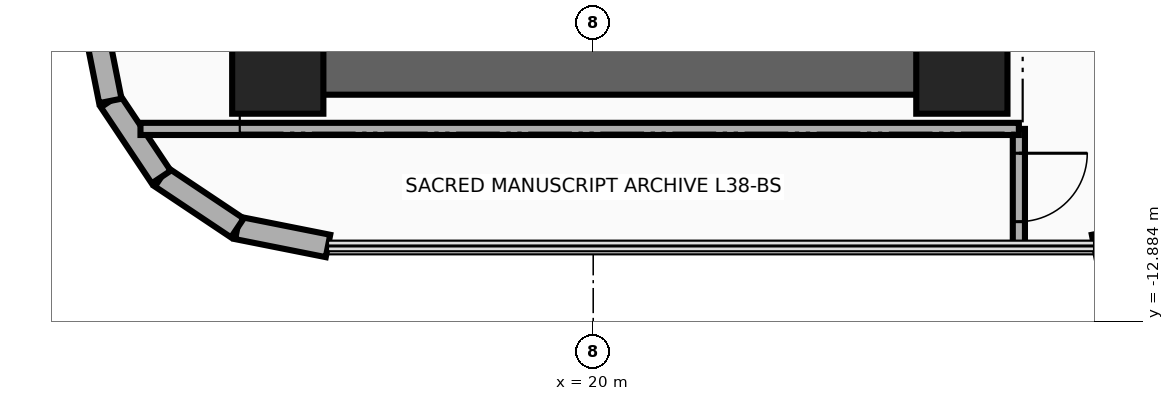
"""IFC4 building model, lengths in metres.
Left out: names, types, materials, properties, quantities, classifications, styles, units other than length and angle.
Written with IfcOpenShell. Run it as: python <this file> out.ifc"""

import sys

from ifc_helpers import new_model, si_unit, direction, frame, frame_2d, origin, origin_2d, place, context, subcontext, project, spatial, rectangle, extrude, source, transform, mapped, element, fill, save


model = new_model("IFC4")
c1 = context("Model", 3, precision=1e-05, world=origin(), true_north=direction((0.0, 1.0)))
c2 = subcontext(c1, "Body", "Model", "MODEL_VIEW")
j1 = project(units=[si_unit("LENGTHUNIT", "METRE"), si_unit("PLANEANGLEUNIT", "RADIAN")], contexts=[c1])
p1 = place(None, origin())
s1 = spatial("IfcSite", under=j1, at=p1, CompositionType="ELEMENT")
p2 = place(p1, origin())
s2 = spatial("IfcBuilding", under=s1, at=p2, CompositionType="ELEMENT")
p3 = place(p2, frame((0.0, 0.0, 150.1)))
s3 = spatial("IfcBuildingStorey", under=s2, at=p3, CompositionType="ELEMENT", Elevation=150.1)
p4 = place(p3, frame((24.85, -9.9, 0.0), z_axis=(0.0, 0.0, 1.0), x_axis=(0.0, 1.0, 0.0)))
e1 = element("IfcWall", 1, at=p4, inside=s3, PredefinedType="SHEAR", context=c2, shape_type="SweptSolid", body=[
    extrude(rectangle(XDim=8.95, YDim=0.7, at=frame_2d((4.475, 0.0))), origin(), (0.0, 0.0, 1.0), 3.46),
])
p5 = place(p3, frame((15.85, -9.55, 0.0), z_axis=(0.0, 0.0, 1.0), x_axis=(1.0, 0.0, 0.0)))
e2 = element("IfcWall", 2, at=p5, inside=s3, PredefinedType="SHEAR", context=c2, shape_type="SweptSolid", body=[
    extrude(rectangle(XDim=9.0, YDim=0.7, at=frame_2d((4.5, 0.0))), origin(), (0.0, 0.0, 1.0), 3.46),
])
m1 = source(origin(), c2, "Body", "SweptSolid", [
    extrude(rectangle(XDim=1.2, YDim=1.2, at=origin_2d()), origin(), (0.0, 0.0, 1.0), 3.7),
])
for number, where, z_axis, x_axis in (
    (3, (15.85, -9.55, 0.0), (0.0, 0.0, 1.0), (1.0, 0.0, 0.0)),
    (4, (24.85, -9.55, 0.0), (0.0, 0.0, 1.0), (1.0, 0.0, 0.0)),
):
    element("IfcColumn", number, at=place(p3, frame(where, z_axis=z_axis, x_axis=x_axis)), inside=s3, PredefinedType="COLUMN", context=c2, shape_type="MappedRepresentation", body=[
        mapped(m1, transform((0.0, 0.0, 0.0), x_axis=(1.0, 0.0, 0.0), y_axis=(0.0, 1.0, 0.0), z_axis=(0.0, 0.0, 1.0), scale=1.0)),
    ])
p6 = place(p3, frame((27.782, -11.653, 0.0), z_axis=(0.0, 0.0, 1.0), x_axis=(-0.980811661072, -0.194957650543, 0.0)))
e5 = element("IfcWall", 5, at=p6, inside=s3, PredefinedType="SOLIDWALL", context=c2, shape_type="SweptSolid", body=[
    extrude(rectangle(XDim=1.216, YDim=0.3, at=frame_2d((0.608, 0.0))), origin(), (0.0, 0.0, 1.0), 3.46),
])
p7 = place(p3, frame((16.511, -11.89, 0.0), z_axis=(0.0, 0.0, 1.0), x_axis=(-0.980804027463, 0.194996050505, 0.0)))
e6 = element("IfcWall", 6, at=p7, inside=s3, PredefinedType="SOLIDWALL", context=c2, shape_type="SweptSolid", body=[
    extrude(rectangle(XDim=1.216, YDim=0.3, at=frame_2d((0.608, 0.0))), origin(), (0.0, 0.0, 1.0), 3.46),
])
for number, where, z_axis, x_axis in (
    (7, (15.318, -11.653, 0.0), (0.0, 0.0, 1.0), (-0.831, 0.556, 0.0)),
    (8, (14.317, -10.983, 0.0), (0.0, 0.0, 1.0), (-0.556, 0.831, 0.0)),
):
    element("IfcWall", number, at=place(p3, frame(where, z_axis=z_axis, x_axis=x_axis)), inside=s3, PredefinedType="SOLIDWALL", context=c2, shape_type="SweptSolid", body=[
        extrude(rectangle(XDim=1.205, YDim=0.3, at=frame_2d((0.603, 0.0))), origin(), (0.0, 0.0, 1.0), 3.46),
    ])
p8 = place(p3, frame((13.647, -9.982, 0.0), z_axis=(0.0, 0.0, 1.0), x_axis=(-0.195189223115, 0.980765602568, 0.0)))
e9 = element("IfcWall", 9, at=p8, inside=s3, PredefinedType="SOLIDWALL", context=c2, shape_type="SweptSolid", body=[
    extrude(rectangle(XDim=1.216, YDim=0.3, at=frame_2d((0.608, 0.0))), origin(), (0.0, 0.0, 1.0), 3.46),
])
p9 = place(p3, frame((25.6, -11.89, 0.0), z_axis=(0.0, 0.0, 1.0), x_axis=(0.0, 1.0, 0.0)))
e10 = element("IfcWall", 10, at=p9, inside=s3, PredefinedType="PARTITIONING", context=c2, shape_type="SweptSolid", body=[
    extrude(rectangle(XDim=1.54, YDim=0.16, at=frame_2d((0.77, 0.0))), origin(), (0.0, 0.0, 1.0), 3.46),
])
p10 = place(p9, frame((0.32, 0.0, 0.0)))
e11 = element("IfcOpeningElement", 11, at=p10, cuts=e10, PredefinedType="OPENING", context=c2, shape_type="SweptSolid", body=[
    extrude(rectangle(XDim=0.9, YDim=2.1, at=frame_2d((0.45, 1.05))), frame((0.0, 0.095, 0.0), z_axis=(0.0, -1.0, 0.0), x_axis=(1.0, 0.0, 0.0)), (0.0, 0.0, 1.0), 0.19),
])
p11 = place(p3, frame((14.044, -10.35, 0.0), z_axis=(0.0, 0.0, 1.0), x_axis=(1.0, 0.0, 0.0)))
e12 = element("IfcWall", 12, at=p11, inside=s3, PredefinedType="PARTITIONING", context=c2, shape_type="SweptSolid", body=[
    extrude(rectangle(XDim=11.556, YDim=0.16, at=frame_2d((5.778, 0.0))), origin(), (0.0, 0.0, 1.0), 3.46),
])
p12 = place(p10, frame((0.9, 0.0, 0.0), z_axis=(0.0, 0.0, 1.0), x_axis=(-1.0, 0.0, 0.0)))
e13 = element("IfcDoor", 13, at=p12, inside=s3, OperationType="SINGLE_SWING_LEFT", PredefinedType="DOOR", context=c2, shape_type="SweptSolid", body=[
    extrude(rectangle(XDim=0.9, YDim=2.1, at=frame_2d((0.45, 1.05))), frame((0.0, 0.025, 0.0), z_axis=(0.0, -1.0, 0.0), x_axis=(1.0, 0.0, 0.0)), (0.0, 0.0, 1.0), 0.05),
])
fill(e11, e13)
save(model, sys.argv[1])
